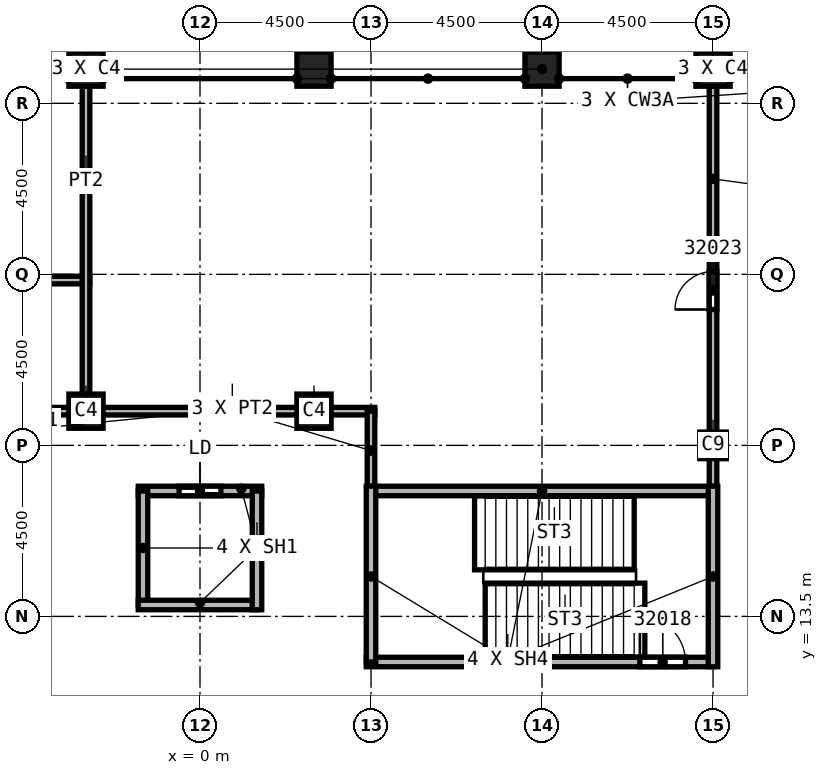
"""IFC4 building model, lengths in metres.
Left out: names, types, materials, properties, quantities, classifications, styles, units other than length and angle.
Written with IfcOpenShell. Run it as: python <this file> out.ifc"""

import sys

from ifc_helpers import new_model, si_unit, direction, frame, frame_2d, origin, origin_2d, place, context, subcontext, project, spatial, rectangle, extrude, element, fill, save


model = new_model("IFC4")
c1 = context("Model", 3, precision=1e-05, world=origin(), true_north=direction((0.0, 1.0)))
c2 = subcontext(c1, "Body", "Model", "MODEL_VIEW")
j1 = project(units=[si_unit("LENGTHUNIT", "METRE"), si_unit("PLANEANGLEUNIT", "RADIAN")], contexts=[c1])
p1 = place(None, origin())
s1 = spatial("IfcSite", under=j1, at=p1, CompositionType="ELEMENT")
p2 = place(p1, origin())
s2 = spatial("IfcBuilding", under=s1, at=p2, CompositionType="ELEMENT")
p3 = place(p2, frame((0.0, 0.0, 356.0)))
s3 = spatial("IfcBuildingStorey", under=s2, at=p3, CompositionType="ELEMENT", Elevation=356.0)
p4 = place(p3, frame((13.5, 18.0, 0.0), z_axis=(0.0, 0.0, 1.0), x_axis=(1.0, 0.0, 0.0)))
e1 = element("IfcColumn", 1, at=p4, inside=s3, PredefinedType="COLUMN", context=c2, shape_type="SweptSolid", body=[
    extrude(rectangle(XDim=0.7, YDim=0.7, at=origin_2d()), origin(), (0.0, 0.0, 1.0), 4.6),
])
for number, where, z_axis, x_axis in (
    (2, (3.0, 27.9, 0.0), (0.0, 0.0, 1.0), (1.0, 0.0, 0.0)),
    (3, (9.0, 27.9, 0.0), (0.0, 0.0, 1.0), (1.0, 0.0, 0.0)),
    (4, (13.5, 27.9, 0.0), (0.0, 0.0, 1.0), (1.0, 0.0, 0.0)),
    (5, (-3.0, 27.9, 0.0), (0.0, 0.0, 1.0), (1.0, 0.0, 0.0)),
    (6, (3.0, 18.9, 0.0), (0.0, 0.0, 1.0), (1.0, 0.0, 0.0)),
    (7, (-3.0, 18.9, 0.0), (0.0, 0.0, 1.0), (1.0, 0.0, 0.0)),
):
    element("IfcColumn", number, at=place(p3, frame(where, z_axis=z_axis, x_axis=x_axis)), inside=s3, PredefinedType="COLUMN", context=c2, shape_type="SweptSolid", body=[
        extrude(rectangle(XDim=0.9, YDim=0.9, at=origin_2d()), origin(), (0.0, 0.0, 1.0), 4.6),
    ])
p5 = place(p3, frame((-13.5, 22.35, 0.0), z_axis=(0.0, 0.0, 1.0), x_axis=(1.0, 0.0, 0.0)))
e8 = element("IfcWall", 8, at=p5, inside=s3, PredefinedType="PARTITIONING", context=c2, shape_type="SweptSolid", body=[
    extrude(rectangle(XDim=10.6, YDim=0.2, at=frame_2d((5.3, 0.0))), origin(), (0.0, 0.0, 1.0), 4.15),
])
p6 = place(p3, frame((-4.5, 18.9, 0.0), z_axis=(0.0, 0.0, 1.0), x_axis=(1.0, 0.0, 0.0)))
e9 = element("IfcWall", 9, at=p6, inside=s3, PredefinedType="PARTITIONING", context=c2, shape_type="SweptSolid", body=[
    extrude(rectangle(XDim=9.1, YDim=0.2, at=frame_2d((4.55, 0.0))), origin(), (0.0, 0.0, 1.0), 4.15),
])
p7 = place(p3, frame((-3.0, 27.45, 0.0), z_axis=(0.0, 0.0, 1.0), x_axis=(0.0, -1.0, 0.0)))
e10 = element("IfcWall", 10, at=p7, inside=s3, PredefinedType="PARTITIONING", context=c2, shape_type="SweptSolid", body=[
    extrude(rectangle(XDim=8.55, YDim=0.2, at=frame_2d((4.275, 0.0))), origin(), (0.0, 0.0, 1.0), 4.15),
])
p8 = place(p3, frame((4.5, 18.9, 0.0), z_axis=(0.0, 0.0, 1.0), x_axis=(0.0, -1.0, 0.0)))
e11 = element("IfcWall", 11, at=p8, inside=s3, PredefinedType="PARTITIONING", context=c2, shape_type="SweptSolid", body=[
    extrude(rectangle(XDim=2.1, YDim=0.2, at=frame_2d((1.05, 0.0))), origin(), (0.0, 0.0, 1.0), 4.15),
])
p9 = place(p3, frame((13.5, 16.675, 0.0), z_axis=(0.0, 0.0, 1.0), x_axis=(0.0, 1.0, 0.0)))
e12 = element("IfcWall", 12, at=p9, inside=s3, PredefinedType="PARTITIONING", context=c2, shape_type="SweptSolid", body=[
    extrude(rectangle(XDim=10.775, YDim=0.2, at=frame_2d((5.387, 0.0))), origin(), (0.0, 0.0, 1.0), 4.15),
])
p10 = place(p9, frame((4.9, 0.0, 0.0)))
e13 = element("IfcOpeningElement", 13, at=p10, cuts=e12, PredefinedType="OPENING", context=c2, shape_type="SweptSolid", body=[
    extrude(rectangle(XDim=1.0, YDim=2.1, at=frame_2d((0.5, 1.05))), frame((0.0, 0.1, 0.0), z_axis=(0.0, -1.0, 0.0), x_axis=(1.0, 0.0, 0.0)), (0.0, 0.0, 1.0), 0.2),
])
p11 = place(p3, frame((-1.625, 16.8, 0.0), z_axis=(0.0, 0.0, 1.0), x_axis=(1.0, 0.0, 0.0)))
e14 = element("IfcWall", 14, at=p11, inside=s3, PredefinedType="SOLIDWALL", context=c2, shape_type="SweptSolid", body=[
    extrude(rectangle(XDim=3.25, YDim=0.25, at=frame_2d((1.625, 0.0))), origin(), (0.0, 0.0, 1.0), 4.15),
])
p12 = place(p11, frame((1.075, 0.0, 0.0)))
e15 = element("IfcOpeningElement", 15, at=p12, cuts=e14, PredefinedType="OPENING", context=c2, shape_type="SweptSolid", body=[
    extrude(rectangle(XDim=1.1, YDim=2.1, at=frame_2d((0.55, 1.05))), frame((0.0, 0.125, 0.0), z_axis=(0.0, -1.0, 0.0), x_axis=(1.0, 0.0, 0.0)), (0.0, 0.0, 1.0), 0.25),
])
p13 = place(p3, frame((-1.5, 13.8, 0.0), z_axis=(0.0, 0.0, 1.0), x_axis=(0.0, 1.0, 0.0)))
e16 = element("IfcWall", 16, at=p13, inside=s3, PredefinedType="SOLIDWALL", context=c2, shape_type="SweptSolid", body=[
    extrude(rectangle(XDim=3.0, YDim=0.25, at=frame_2d((1.5, 0.0))), origin(), (0.0, 0.0, 1.0), 4.15),
])
for number, where, z_axis, x_axis in (
    (17, (1.5, 13.8, 0.0), (0.0, 0.0, 1.0), (-1.0, 0.0, 0.0)),
    (18, (1.5, 16.8, 0.0), (0.0, 0.0, 1.0), (0.0, -1.0, 0.0)),
):
    element("IfcWall", number, at=place(p3, frame(where, z_axis=z_axis, x_axis=x_axis)), inside=s3, PredefinedType="SOLIDWALL", context=c2, shape_type="SweptSolid", body=[
        extrude(rectangle(XDim=3.125, YDim=0.25, at=frame_2d((1.562, 0.0))), origin(), (0.0, 0.0, 1.0), 4.15),
    ])
p14 = place(p3, frame((4.375, 12.3, 0.0), z_axis=(0.0, 0.0, 1.0), x_axis=(1.0, 0.0, 0.0)))
e19 = element("IfcWall", 19, at=p14, inside=s3, PredefinedType="SOLIDWALL", context=c2, shape_type="SweptSolid", body=[
    extrude(rectangle(XDim=9.125, YDim=0.25, at=frame_2d((4.562, 0.0))), origin(), (0.0, 0.0, 1.0), 4.15),
])
p15 = place(p14, frame((7.2, 0.0, 0.0)))
e20 = element("IfcOpeningElement", 20, at=p15, cuts=e19, PredefinedType="OPENING", context=c2, shape_type="SweptSolid", body=[
    extrude(rectangle(XDim=1.2, YDim=2.1, at=frame_2d((0.6, 1.05))), frame((0.0, 0.125, 0.0), z_axis=(0.0, -1.0, 0.0), x_axis=(1.0, 0.0, 0.0)), (0.0, 0.0, 1.0), 0.25),
])
p16 = place(p3, frame((4.4, 16.8, 0.0), z_axis=(0.0, 0.0, 1.0), x_axis=(1.0, 0.0, 0.0)))
e21 = element("IfcWall", 21, at=p16, inside=s3, PredefinedType="SOLIDWALL", context=c2, shape_type="SweptSolid", body=[
    extrude(rectangle(XDim=9.1, YDim=0.25, at=frame_2d((4.55, 0.0))), origin(), (0.0, 0.0, 1.0), 4.15),
])
p17 = place(p3, frame((4.5, 12.3, 0.0), z_axis=(0.0, 0.0, 1.0), x_axis=(0.0, 1.0, 0.0)))
e22 = element("IfcWall", 22, at=p17, inside=s3, PredefinedType="SOLIDWALL", context=c2, shape_type="SweptSolid", body=[
    extrude(rectangle(XDim=4.625, YDim=0.25, at=frame_2d((2.312, 0.0))), origin(), (0.0, 0.0, 1.0), 4.15),
])
p18 = place(p3, frame((13.5, 12.175, 0.0), z_axis=(0.0, 0.0, 1.0), x_axis=(0.0, 1.0, 0.0)))
e23 = element("IfcWall", 23, at=p18, inside=s3, PredefinedType="SOLIDWALL", context=c2, shape_type="SweptSolid", body=[
    extrude(rectangle(XDim=4.75, YDim=0.25, at=frame_2d((2.375, 0.0))), origin(), (0.0, 0.0, 1.0), 4.15),
])
p19 = place(p15, origin())
e24 = element("IfcDoor", 24, at=p19, inside=s3, OperationType="SINGLE_SWING_LEFT", PredefinedType="DOOR", context=c2, shape_type="SweptSolid", body=[
    extrude(rectangle(XDim=1.2, YDim=2.1, at=frame_2d((0.6, 1.05))), frame((0.0, 0.025, 0.0), z_axis=(0.0, -1.0, 0.0), x_axis=(1.0, 0.0, 0.0)), (0.0, 0.0, 1.0), 0.05),
])
fill(e20, e24)
p20 = place(p10, origin())
e25 = element("IfcDoor", 25, at=p20, inside=s3, OperationType="SINGLE_SWING_RIGHT", PredefinedType="DOOR", context=c2, shape_type="SweptSolid", body=[
    extrude(rectangle(XDim=1.0, YDim=2.1, at=frame_2d((0.5, 1.05))), frame((0.0, 0.025, 0.0), z_axis=(0.0, -1.0, 0.0), x_axis=(1.0, 0.0, 0.0)), (0.0, 0.0, 1.0), 0.05),
])
fill(e13, e25)
p21 = place(p12, origin())
e26 = element("IfcDoor", 26, at=p21, inside=s3, OperationType="SLIDING_TO_LEFT", PredefinedType="DOOR", context=c2, shape_type="SweptSolid", body=[
    extrude(rectangle(XDim=1.1, YDim=2.1, at=frame_2d((0.55, 1.05))), frame((0.0, 0.025, 0.0), z_axis=(0.0, -1.0, 0.0), x_axis=(1.0, 0.0, 0.0)), (0.0, 0.0, 1.0), 0.05),
])
fill(e15, e26)
save(model, sys.argv[1])
